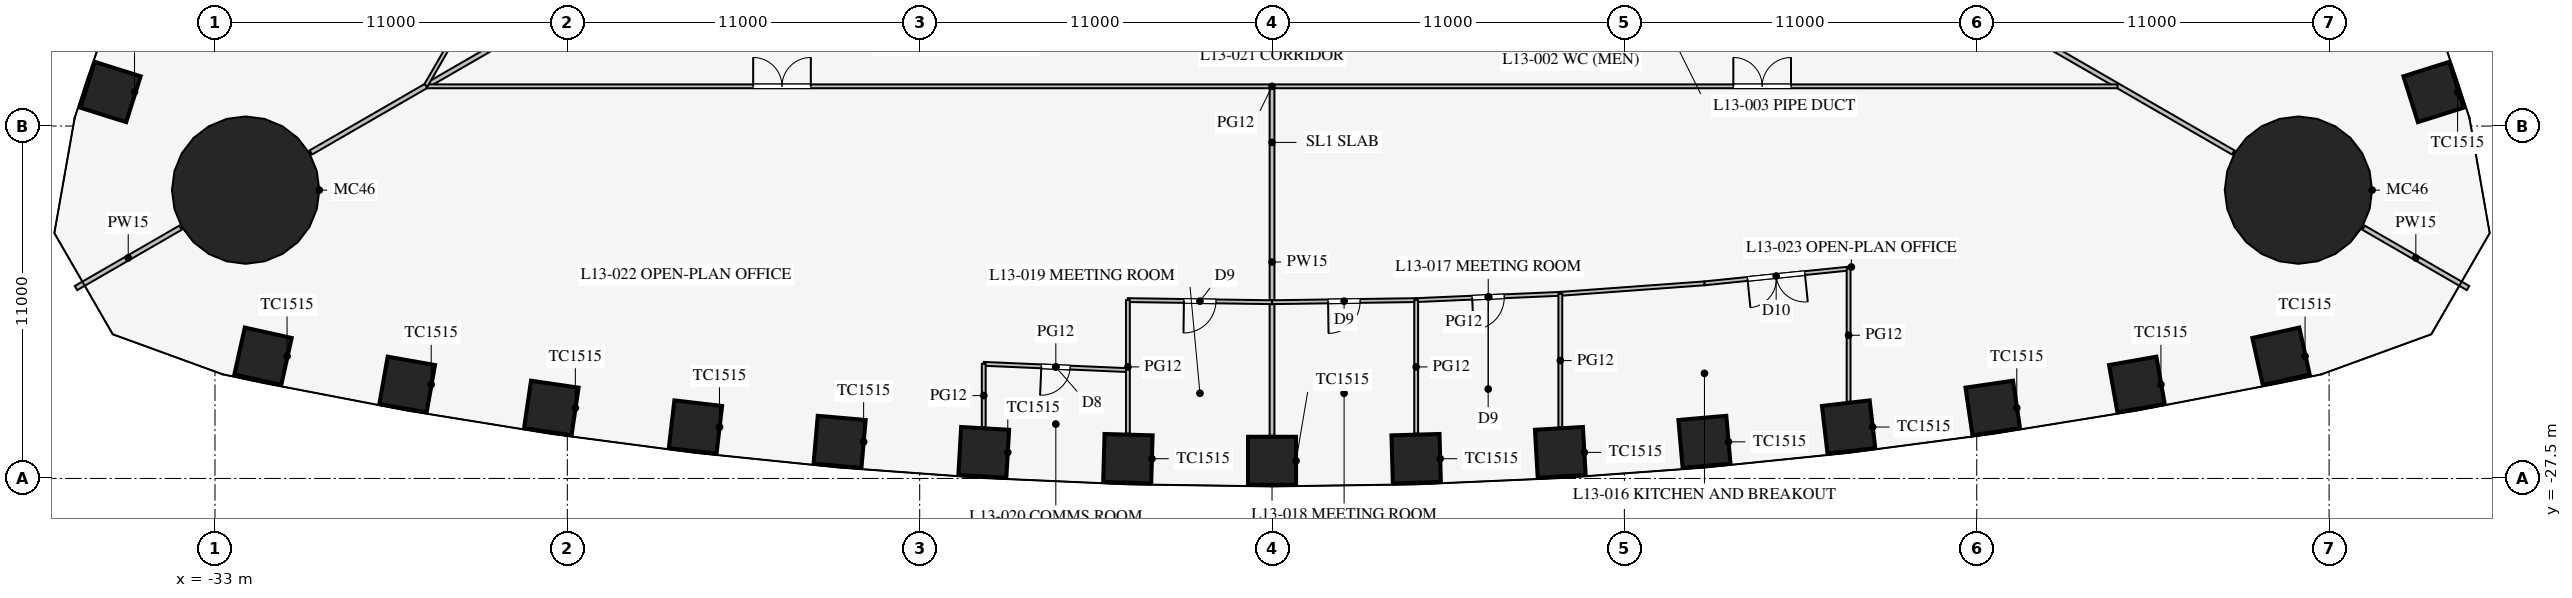
"""IFC4 building model, lengths in metres.
Left out: names, types, materials, properties, quantities, classifications, styles, units other than length and angle.
Written with IfcOpenShell. Run it as: python <this file> out.ifc"""

import sys

from ifc_helpers import new_model, si_unit, direction, frame, frame_2d, origin, origin_2d, place, context, subcontext, project, spatial, rectangle, circle, extrude, element, fill, save


model = new_model("IFC4")
c1 = context("Model", 3, precision=1e-05, world=origin(), true_north=direction((0.0, 1.0)))
c2 = subcontext(c1, "Body", "Model", "MODEL_VIEW")
j1 = project(units=[si_unit("LENGTHUNIT", "METRE"), si_unit("PLANEANGLEUNIT", "RADIAN")], contexts=[c1])
p1 = place(None, origin())
s1 = spatial("IfcSite", under=j1, at=p1, CompositionType="ELEMENT")
p2 = place(p1, origin())
s2 = spatial("IfcBuilding", under=s1, at=p2, CompositionType="ELEMENT")
p3 = place(p2, frame((0.0, 0.0, 58.5)))
s3 = spatial("IfcBuildingStorey", under=s2, at=p3, CompositionType="ELEMENT", Elevation=58.5)
for number, where, z_axis, x_axis in (
    (1, (-31.5, -23.685, 0.0), (0.0, 0.0, 1.0), (0.976, -0.217, 0.0)),
    (2, (-27.0, -24.568, 0.0), (0.0, 0.0, 1.0), (0.985, -0.174, 0.0)),
    (3, (-22.5, -25.299, 0.0), (0.0, 0.0, 1.0), (0.989, -0.145, 0.0)),
    (4, (-18.0, -25.895, 0.0), (0.0, 0.0, 1.0), (0.993, -0.116, 0.0)),
    (5, (-13.5, -26.357, 0.0), (0.0, 0.0, 1.0), (0.996, -0.087, 0.0)),
    (6, (-9.0, -26.686, 0.0), (0.0, 0.0, 1.0), (0.998, -0.058, 0.0)),
    (7, (-4.5, -26.883, 0.0), (0.0, 0.0, 1.0), (1.0, -0.029, 0.0)),
    (8, (0.0, -26.949, 0.0), (0.0, 0.0, 1.0), (1.0, 0.0, 0.0)),
    (9, (4.5, -26.883, 0.0), (0.0, 0.0, 1.0), (1.0, 0.029, 0.0)),
    (10, (9.0, -26.686, 0.0), (0.0, 0.0, 1.0), (0.998, 0.058, 0.0)),
    (11, (13.5, -26.357, 0.0), (0.0, 0.0, 1.0), (0.996, 0.087, 0.0)),
    (12, (18.0, -25.895, 0.0), (0.0, 0.0, 1.0), (0.993, 0.116, 0.0)),
    (13, (22.5, -25.299, 0.0), (0.0, 0.0, 1.0), (0.989, 0.145, 0.0)),
    (14, (27.0, -24.568, 0.0), (0.0, 0.0, 1.0), (0.985, 0.174, 0.0)),
    (15, (31.5, -23.685, 0.0), (0.0, 0.0, 1.0), (0.976, 0.217, 0.0)),
    (16, (36.262, -15.438, 0.0), (0.0, 0.0, 1.0), (-0.3, 0.954, 0.0)),
    (17, (-36.262, -15.438, 0.0), (0.0, 0.0, 1.0), (-0.3, -0.954, 0.0)),
):
    element("IfcColumn", number, at=place(p3, frame(where, z_axis=z_axis, x_axis=x_axis)), inside=s3, PredefinedType="COLUMN", context=c2, shape_type="SweptSolid", body=[
        extrude(rectangle(XDim=1.5, YDim=1.5, at=origin_2d()), origin(), (0.0, 0.0, 1.0), 4.2),
    ])
for number, where, z_axis, x_axis in (
    (18, (32.043, -18.5, 0.0), (0.0, 0.0, 1.0), (1.0, 0.0, 0.0)),
    (19, (-32.043, -18.5, 0.0), (0.0, 0.0, 1.0), (1.0, 0.0, 0.0)),
):
    element("IfcColumn", number, at=place(p3, frame(where, z_axis=z_axis, x_axis=x_axis)), inside=s3, PredefinedType="COLUMN", context=c2, shape_type="SweptSolid", body=[
        extrude(circle(Radius=2.3, at=origin_2d()), origin(), (0.0, 0.0, 1.0), 4.2),
    ])
p4 = place(p3, frame((14.203, -8.2, 0.0), z_axis=(0.0, 0.0, 1.0), x_axis=(0.866024965723, -0.500000758745, 0.0)))
e20 = element("IfcWall", 20, at=p4, inside=s3, PredefinedType="PARTITIONING", context=c2, shape_type="SweptSolid", body=[
    extrude(rectangle(XDim=18.25, YDim=0.15, at=frame_2d((9.125, 0.0))), origin(), (0.0, 0.0, 1.0), 2.3),
])
p5 = place(p3, frame((34.078, -19.675, 0.0), z_axis=(0.0, 0.0, 1.0), x_axis=(0.866019247219, -0.500010663332, 0.0)))
e21 = element("IfcWall", 21, at=p5, inside=s3, PredefinedType="PARTITIONING", context=c2, shape_type="SweptSolid", body=[
    extrude(rectangle(XDim=3.764, YDim=0.15, at=frame_2d((1.882, 0.0))), origin(), (0.0, 0.0, 1.0), 2.3),
])
p6 = place(p3, frame((-14.203, -8.2, 0.0), z_axis=(0.0, 0.0, 1.0), x_axis=(-0.866024965723, -0.500000758745, 0.0)))
e22 = element("IfcWall", 22, at=p6, inside=s3, PredefinedType="PARTITIONING", context=c2, shape_type="SweptSolid", body=[
    extrude(rectangle(XDim=18.25, YDim=0.15, at=frame_2d((9.125, 0.0))), origin(), (0.0, 0.0, 1.0), 2.3),
])
p7 = place(p3, frame((-34.078, -19.675, 0.0), z_axis=(0.0, 0.0, 1.0), x_axis=(-0.866019247219, -0.500010663332, 0.0)))
e23 = element("IfcWall", 23, at=p7, inside=s3, PredefinedType="PARTITIONING", context=c2, shape_type="SweptSolid", body=[
    extrude(rectangle(XDim=3.764, YDim=0.15, at=frame_2d((1.882, 0.0))), origin(), (0.0, 0.0, 1.0), 2.3),
])
p8 = place(p3, frame((0.0, -15.32, 0.0), z_axis=(0.0, 0.0, 1.0), x_axis=(0.0, -1.0, 0.0)))
e24 = element("IfcWall", 24, at=p8, inside=s3, PredefinedType="PARTITIONING", context=c2, shape_type="SweptSolid", body=[
    extrude(rectangle(XDim=10.849, YDim=0.15, at=frame_2d((5.424, 0.0))), origin(), (0.0, 0.0, 1.0), 2.8),
])
p9 = place(p3, frame((-26.398, -15.26, 0.0), z_axis=(0.0, 0.0, 1.0), x_axis=(1.0, 0.0, 0.0)))
e25 = element("IfcWall", 25, at=p9, inside=s3, PredefinedType="PARTITIONING", context=c2, shape_type="SweptSolid", body=[
    extrude(rectangle(XDim=52.796, YDim=0.12, at=frame_2d((26.398, 0.0))), origin(), (0.0, 0.0, 1.0), 2.9),
])
p10 = place(p9, frame((10.2, 0.0, 0.15)))
e26 = element("IfcOpeningElement", 26, at=p10, cuts=e25, PredefinedType="OPENING", context=c2, shape_type="SweptSolid", body=[
    extrude(rectangle(XDim=1.8, YDim=2.1, at=frame_2d((0.9, 1.05))), frame((0.0, 0.07, 0.0), z_axis=(0.0, -1.0, 0.0), x_axis=(1.0, 0.0, 0.0)), (0.0, 0.0, 1.0), 0.14),
])
p11 = place(p9, frame((40.8, 0.0, 0.15)))
e27 = element("IfcOpeningElement", 27, at=p11, cuts=e25, PredefinedType="OPENING", context=c2, shape_type="SweptSolid", body=[
    extrude(rectangle(XDim=1.8, YDim=2.1, at=frame_2d((0.9, 1.05))), frame((0.0, 0.07, 0.0), z_axis=(0.0, -1.0, 0.0), x_axis=(1.0, 0.0, 0.0)), (0.0, 0.0, 1.0), 0.14),
])
p12 = place(p3, frame((0.0, -21.999, 0.0), z_axis=(0.0, 0.0, 1.0), x_axis=(0.999894311967, 0.014538393859, 0.0)))
e28 = element("IfcWall", 28, at=p12, inside=s3, PredefinedType="PARTITIONING", context=c2, shape_type="SweptSolid", body=[
    extrude(rectangle(XDim=4.5, YDim=0.12, at=frame_2d((2.25, 0.0))), origin(), (0.0, 0.0, 1.0), 2.9),
])
p13 = place(p12, frame((1.75, 0.0, 0.15)))
e29 = element("IfcOpeningElement", 29, at=p13, cuts=e28, PredefinedType="OPENING", context=c2, shape_type="SweptSolid", body=[
    extrude(rectangle(XDim=1.0, YDim=2.1, at=frame_2d((0.5, 1.05))), frame((0.0, 0.07, 0.0), z_axis=(0.0, -1.0, 0.0), x_axis=(1.0, 0.0, 0.0)), (0.0, 0.0, 1.0), 0.14),
])
p14 = place(p3, frame((13.5, -21.41, 0.0), z_axis=(0.0, 0.0, 1.0), x_axis=(0.994833141332, 0.101523499286, 0.0)))
e30 = element("IfcWall", 30, at=p14, inside=s3, PredefinedType="PARTITIONING", context=c2, shape_type="SweptSolid", body=[
    extrude(rectangle(XDim=4.523, YDim=0.12, at=frame_2d((2.262, 0.0))), origin(), (0.0, 0.0, 1.0), 2.9),
])
p15 = place(p14, frame((1.35, 0.0, 0.15)))
e31 = element("IfcOpeningElement", 31, at=p15, cuts=e30, PredefinedType="OPENING", context=c2, shape_type="SweptSolid", body=[
    extrude(rectangle(XDim=1.8, YDim=2.1, at=frame_2d((0.9, 1.05))), frame((0.0, 0.07, 0.0), z_axis=(0.0, -1.0, 0.0), x_axis=(1.0, 0.0, 0.0)), (0.0, 0.0, 1.0), 0.14),
])
p16 = place(p3, frame((4.5, -21.933, 0.0), z_axis=(0.0, 0.0, 1.0), x_axis=(0.999052370647, 0.043524254212, 0.0)))
e32 = element("IfcWall", 32, at=p16, inside=s3, PredefinedType="PARTITIONING", context=c2, shape_type="SweptSolid", body=[
    extrude(rectangle(XDim=4.504, YDim=0.12, at=frame_2d((2.252, 0.0))), origin(), (0.0, 0.0, 1.0), 2.9),
])
p17 = place(p16, frame((1.75, 0.0, 0.15)))
e33 = element("IfcOpeningElement", 33, at=p17, cuts=e32, PredefinedType="OPENING", context=c2, shape_type="SweptSolid", body=[
    extrude(rectangle(XDim=1.0, YDim=2.1, at=frame_2d((0.5, 1.05))), frame((0.0, 0.07, 0.0), z_axis=(0.0, -1.0, 0.0), x_axis=(1.0, 0.0, 0.0)), (0.0, 0.0, 1.0), 0.14),
])
p18 = place(p3, frame((9.0, -21.737, 0.0), z_axis=(0.0, 0.0, 1.0), x_axis=(0.997363894896, 0.072562119306, 0.0)))
e34 = element("IfcWall", 34, at=p18, inside=s3, PredefinedType="PARTITIONING", context=c2, shape_type="SweptSolid", body=[
    extrude(rectangle(XDim=4.512, YDim=0.12, at=frame_2d((2.256, 0.0))), origin(), (0.0, 0.0, 1.0), 2.9),
])
p19 = place(p3, frame((-4.5, -21.933, 0.0), z_axis=(0.0, 0.0, 1.0), x_axis=(0.999894311967, -0.014538393859, 0.0)))
e35 = element("IfcWall", 35, at=p19, inside=s3, PredefinedType="PARTITIONING", context=c2, shape_type="SweptSolid", body=[
    extrude(rectangle(XDim=4.5, YDim=0.12, at=frame_2d((2.25, 0.0))), origin(), (0.0, 0.0, 1.0), 2.9),
])
p20 = place(p19, frame((1.75, 0.0, 0.15)))
e36 = element("IfcOpeningElement", 36, at=p20, cuts=e35, PredefinedType="OPENING", context=c2, shape_type="SweptSolid", body=[
    extrude(rectangle(XDim=1.0, YDim=2.1, at=frame_2d((0.5, 1.05))), frame((0.0, 0.07, 0.0), z_axis=(0.0, -1.0, 0.0), x_axis=(1.0, 0.0, 0.0)), (0.0, 0.0, 1.0), 0.14),
])
p21 = place(p3, frame((-9.0, -23.922, 0.0), z_axis=(0.0, 0.0, 1.0), x_axis=(0.999052370647, -0.043524254212, 0.0)))
e37 = element("IfcWall", 37, at=p21, inside=s3, PredefinedType="PARTITIONING", context=c2, shape_type="SweptSolid", body=[
    extrude(rectangle(XDim=4.504, YDim=0.12, at=frame_2d((2.252, 0.0))), origin(), (0.0, 0.0, 1.0), 2.9),
])
p22 = place(p21, frame((1.8, 0.0, 0.15)))
e38 = element("IfcOpeningElement", 38, at=p22, cuts=e37, PredefinedType="OPENING", context=c2, shape_type="SweptSolid", body=[
    extrude(rectangle(XDim=0.9, YDim=2.1, at=frame_2d((0.45, 1.05))), frame((0.0, 0.07, 0.0), z_axis=(0.0, -1.0, 0.0), x_axis=(1.0, 0.0, 0.0)), (0.0, 0.0, 1.0), 0.14),
])
p23 = place(p3, frame((18.0, -20.951, 0.0), z_axis=(0.0, 0.0, 1.0), x_axis=(0.0, -1.0, 0.0)))
e39 = element("IfcWall", 39, at=p23, inside=s3, PredefinedType="PARTITIONING", context=c2, shape_type="SweptSolid", body=[
    extrude(rectangle(XDim=4.159, YDim=0.12, at=frame_2d((2.08, 0.0))), origin(), (0.0, 0.0, 1.0), 2.6),
])
p24 = place(p3, frame((4.5, -21.933, 0.0), z_axis=(0.0, 0.0, 1.0), x_axis=(0.0, -1.0, 0.0)))
e40 = element("IfcWall", 40, at=p24, inside=s3, PredefinedType="PARTITIONING", context=c2, shape_type="SweptSolid", body=[
    extrude(rectangle(XDim=4.169, YDim=0.12, at=frame_2d((2.085, 0.0))), origin(), (0.0, 0.0, 1.0), 2.8),
])
p25 = place(p3, frame((9.0, -21.737, 0.0), z_axis=(0.0, 0.0, 1.0), x_axis=(0.0, -1.0, 0.0)))
e41 = element("IfcWall", 41, at=p25, inside=s3, PredefinedType="PARTITIONING", context=c2, shape_type="SweptSolid", body=[
    extrude(rectangle(XDim=4.167, YDim=0.12, at=frame_2d((2.084, 0.0))), origin(), (0.0, 0.0, 1.0), 2.8),
])
p26 = place(p3, frame((-4.5, -21.933, 0.0), z_axis=(0.0, 0.0, 1.0), x_axis=(0.0, -1.0, 0.0)))
e42 = element("IfcWall", 42, at=p26, inside=s3, PredefinedType="PARTITIONING", context=c2, shape_type="SweptSolid", body=[
    extrude(rectangle(XDim=4.169, YDim=0.12, at=frame_2d((2.085, 0.0))), origin(), (0.0, 0.0, 1.0), 2.8),
])
p27 = place(p3, frame((-9.0, -23.922, 0.0), z_axis=(0.0, 0.0, 1.0), x_axis=(0.0, -1.0, 0.0)))
e43 = element("IfcWall", 43, at=p27, inside=s3, PredefinedType="PARTITIONING", context=c2, shape_type="SweptSolid", body=[
    extrude(rectangle(XDim=1.982, YDim=0.12, at=frame_2d((0.991, 0.0))), origin(), (0.0, 0.0, 1.0), 2.8),
])
p28 = place(p3, frame((-0.016, 30.491, 0.0), z_axis=(0.0, 0.0, 1.0), x_axis=(-0.50000091641, -0.866024874695, 0.0)))
e44 = element("IfcWall", 44, at=p28, inside=s3, PredefinedType="PARTITIONING", context=c2, shape_type="SweptSolid", body=[
    extrude(rectangle(XDim=52.796, YDim=0.12, at=frame_2d((26.398, 0.0))), origin(), (0.0, 0.0, 1.0), 2.9),
])
p29 = place(p28, frame((10.2, 0.0, 0.15)))
e45 = element("IfcOpeningElement", 45, at=p29, cuts=e44, PredefinedType="OPENING", context=c2, shape_type="SweptSolid", body=[
    extrude(rectangle(XDim=1.8, YDim=2.1, at=frame_2d((0.9, 1.05))), frame((0.0, 0.07, 0.0), z_axis=(0.0, -1.0, 0.0), x_axis=(1.0, 0.0, 0.0)), (0.0, 0.0, 1.0), 0.14),
])
p30 = place(p28, frame((40.8, 0.0, 0.15)))
e46 = element("IfcOpeningElement", 46, at=p30, cuts=e44, PredefinedType="OPENING", context=c2, shape_type="SweptSolid", body=[
    extrude(rectangle(XDim=1.8, YDim=2.1, at=frame_2d((0.9, 1.05))), frame((0.0, 0.07, 0.0), z_axis=(0.0, -1.0, 0.0), x_axis=(1.0, 0.0, 0.0)), (0.0, 0.0, 1.0), 0.14),
])
p31 = place(p15, frame((1.8, 0.0, 0.0), z_axis=(0.0, 0.0, 1.0), x_axis=(-1.0, 0.0, 0.0)))
e47 = element("IfcDoor", 47, at=p31, inside=s3, OperationType="DOUBLE_DOOR_SINGLE_SWING", PredefinedType="DOOR", context=c2, shape_type="SweptSolid", body=[
    extrude(rectangle(XDim=1.8, YDim=2.1, at=frame_2d((0.9, 1.05))), frame((0.0, 0.025, 0.0), z_axis=(0.0, -1.0, 0.0), x_axis=(1.0, 0.0, 0.0)), (0.0, 0.0, 1.0), 0.05),
])
fill(e31, e47)
p32 = place(p17, frame((1.0, 0.0, 0.0), z_axis=(0.0, 0.0, 1.0), x_axis=(-1.0, 0.0, 0.0)))
e48 = element("IfcDoor", 48, at=p32, inside=s3, OperationType="SINGLE_SWING_RIGHT", PredefinedType="DOOR", context=c2, shape_type="SweptSolid", body=[
    extrude(rectangle(XDim=1.0, YDim=2.1, at=frame_2d((0.5, 1.05))), frame((0.0, 0.025, 0.0), z_axis=(0.0, -1.0, 0.0), x_axis=(1.0, 0.0, 0.0)), (0.0, 0.0, 1.0), 0.05),
])
fill(e33, e48)
p33 = place(p13, frame((1.0, 0.0, 0.0), z_axis=(0.0, 0.0, 1.0), x_axis=(-1.0, 0.0, 0.0)))
e49 = element("IfcDoor", 49, at=p33, inside=s3, OperationType="SINGLE_SWING_RIGHT", PredefinedType="DOOR", context=c2, shape_type="SweptSolid", body=[
    extrude(rectangle(XDim=1.0, YDim=2.1, at=frame_2d((0.5, 1.05))), frame((0.0, 0.025, 0.0), z_axis=(0.0, -1.0, 0.0), x_axis=(1.0, 0.0, 0.0)), (0.0, 0.0, 1.0), 0.05),
])
fill(e29, e49)
p34 = place(p20, frame((1.0, 0.0, 0.0), z_axis=(0.0, 0.0, 1.0), x_axis=(-1.0, 0.0, 0.0)))
e50 = element("IfcDoor", 50, at=p34, inside=s3, OperationType="SINGLE_SWING_RIGHT", PredefinedType="DOOR", context=c2, shape_type="SweptSolid", body=[
    extrude(rectangle(XDim=1.0, YDim=2.1, at=frame_2d((0.5, 1.05))), frame((0.0, 0.025, 0.0), z_axis=(0.0, -1.0, 0.0), x_axis=(1.0, 0.0, 0.0)), (0.0, 0.0, 1.0), 0.05),
])
fill(e36, e50)
p35 = place(p22, frame((0.9, 0.0, 0.0), z_axis=(0.0, 0.0, 1.0), x_axis=(-1.0, 0.0, 0.0)))
e51 = element("IfcDoor", 51, at=p35, inside=s3, OperationType="SINGLE_SWING_RIGHT", PredefinedType="DOOR", context=c2, shape_type="SweptSolid", body=[
    extrude(rectangle(XDim=0.9, YDim=2.1, at=frame_2d((0.45, 1.05))), frame((0.0, 0.025, 0.0), z_axis=(0.0, -1.0, 0.0), x_axis=(1.0, 0.0, 0.0)), (0.0, 0.0, 1.0), 0.05),
])
fill(e38, e51)
p36 = place(p10, origin())
e52 = element("IfcDoor", 52, at=p36, inside=s3, OperationType="DOUBLE_DOOR_SINGLE_SWING", PredefinedType="DOOR", context=c2, shape_type="SweptSolid", body=[
    extrude(rectangle(XDim=1.8, YDim=2.1, at=frame_2d((0.9, 1.05))), frame((0.0, 0.025, 0.0), z_axis=(0.0, -1.0, 0.0), x_axis=(1.0, 0.0, 0.0)), (0.0, 0.0, 1.0), 0.05),
])
fill(e26, e52)
p37 = place(p11, origin())
e53 = element("IfcDoor", 53, at=p37, inside=s3, OperationType="DOUBLE_DOOR_SINGLE_SWING", PredefinedType="DOOR", context=c2, shape_type="SweptSolid", body=[
    extrude(rectangle(XDim=1.8, YDim=2.1, at=frame_2d((0.9, 1.05))), frame((0.0, 0.025, 0.0), z_axis=(0.0, -1.0, 0.0), x_axis=(1.0, 0.0, 0.0)), (0.0, 0.0, 1.0), 0.05),
])
fill(e27, e53)
save(model, sys.argv[1])
